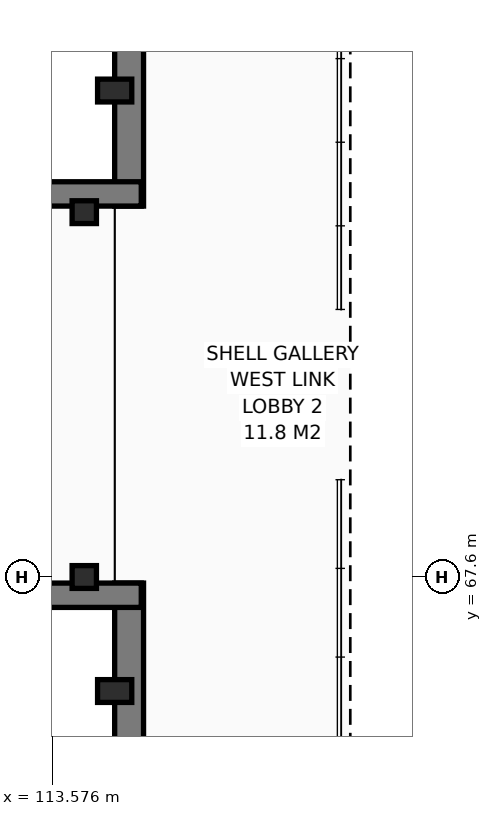
"""IFC4 building model, lengths in metres.
Left out: names, types, materials, properties, quantities, classifications, styles, units other than length and angle.
Written with IfcOpenShell. Run it as: python <this file> out.ifc"""

import sys

from ifc_helpers import new_model, si_unit, direction, frame, frame_2d, origin, origin_2d, place, context, subcontext, project, spatial, rectangle, i_section, extrude, element, save


model = new_model("IFC4")
c1 = context("Model", 3, precision=1e-05, world=origin(), true_north=direction((0.0, 1.0)))
c2 = subcontext(c1, "Body", "Model", "MODEL_VIEW")
j1 = project(units=[si_unit("LENGTHUNIT", "METRE"), si_unit("PLANEANGLEUNIT", "RADIAN")], contexts=[c1])
p1 = place(None, origin())
s1 = spatial("IfcSite", under=j1, at=p1, CompositionType="ELEMENT")
p2 = place(p1, origin())
s2 = spatial("IfcBuilding", under=s1, at=p2, CompositionType="ELEMENT")
p3 = place(p2, frame((0.0, 0.0, 5.1)))
s3 = spatial("IfcBuildingStorey", under=s2, at=p3, CompositionType="ELEMENT", Elevation=5.1)
for number, where, z_axis, x_axis in (
    (1, (114.4, 66.1, 0.0), (0.0, 0.0, 1.0), (1.0, 0.0, 0.0)),
    (2, (114.4, 74.0, 0.0), (0.0, 0.0, 1.0), (1.0, 0.0, 0.0)),
):
    element("IfcColumn", number, at=place(p3, frame(where, z_axis=z_axis, x_axis=x_axis)), inside=s3, PredefinedType="COLUMN", context=c2, shape_type="SweptSolid", body=[
        extrude(i_section(OverallWidth=0.3, OverallDepth=0.45, WebThickness=0.014, FlangeThickness=0.026, FilletRadius=0.027, at=origin_2d()), origin(), (0.0, 0.0, 1.0), 4.42),
    ])
for number, where, z_axis, x_axis in (
    (3, (114.0, 67.6, 0.0), (0.0, 0.0, 1.0), (1.0, 0.0, 0.0)),
    (4, (114.0, 72.4, 0.0), (0.0, 0.0, 1.0), (1.0, 0.0, 0.0)),
):
    element("IfcColumn", number, at=place(p3, frame(where, z_axis=z_axis, x_axis=x_axis)), inside=s3, PredefinedType="COLUMN", context=c2, shape_type="SweptSolid", body=[
        extrude(i_section(OverallWidth=0.3, OverallDepth=0.32, WebThickness=0.011, FlangeThickness=0.021, FilletRadius=0.027, at=origin_2d()), origin(), (0.0, 0.0, 1.0), 4.42),
    ])
p4 = place(p3, frame((114.59, 58.2, 0.0), z_axis=(0.0, 0.0, 1.0), x_axis=(0.0, 1.0, 0.0)))
e5 = element("IfcWall", 5, at=p4, inside=s3, PredefinedType="SOLIDWALL", context=c2, shape_type="SweptSolid", body=[
    extrude(rectangle(XDim=9.32, YDim=0.38, at=frame_2d((4.66, 0.0))), origin(), (0.0, 0.0, 1.0), 4.17),
])
p5 = place(p3, frame((114.59, 72.48, 0.0), z_axis=(0.0, 0.0, 1.0), x_axis=(0.0, 1.0, 0.0)))
e6 = element("IfcWall", 6, at=p5, inside=s3, PredefinedType="SOLIDWALL", context=c2, shape_type="SweptSolid", body=[
    extrude(rectangle(XDim=40.83, YDim=0.38, at=frame_2d((20.415, 0.0))), origin(), (0.0, 0.0, 1.0), 4.17),
])
p6 = place(p5, frame((5.805, 0.0, 0.85)))
e7 = element("IfcOpeningElement", 7, at=p6, cuts=e6, PredefinedType="OPENING", context=c2, shape_type="SweptSolid", body=[
    extrude(rectangle(XDim=2.7, YDim=1.5, at=frame_2d((1.35, 0.75))), frame((0.0, 0.2, 0.0), z_axis=(0.0, -1.0, 0.0), x_axis=(1.0, 0.0, 0.0)), (0.0, 0.0, 1.0), 0.4),
])
p7 = place(p5, frame((12.61, 0.0, 0.85)))
e8 = element("IfcOpeningElement", 8, at=p7, cuts=e6, PredefinedType="OPENING", context=c2, shape_type="SweptSolid", body=[
    extrude(rectangle(XDim=2.1, YDim=1.7, at=frame_2d((1.05, 0.85))), frame((0.0, 0.2, 0.0), z_axis=(0.0, -1.0, 0.0), x_axis=(1.0, 0.0, 0.0)), (0.0, 0.0, 1.0), 0.4),
])
p8 = place(p5, frame((19.415, 0.0, 0.85)))
e9 = element("IfcOpeningElement", 9, at=p8, cuts=e6, PredefinedType="OPENING", context=c2, shape_type="SweptSolid", body=[
    extrude(rectangle(XDim=2.5, YDim=1.7, at=frame_2d((1.25, 0.85))), frame((0.0, 0.2, 0.0), z_axis=(0.0, -1.0, 0.0), x_axis=(1.0, 0.0, 0.0)), (0.0, 0.0, 1.0), 0.4),
])
p9 = place(p5, frame((26.22, 0.0, 0.85)))
e10 = element("IfcOpeningElement", 10, at=p9, cuts=e6, PredefinedType="OPENING", context=c2, shape_type="SweptSolid", body=[
    extrude(rectangle(XDim=2.9, YDim=1.7, at=frame_2d((1.45, 0.85))), frame((0.0, 0.2, 0.0), z_axis=(0.0, -1.0, 0.0), x_axis=(1.0, 0.0, 0.0)), (0.0, 0.0, 1.0), 0.4),
])
p10 = place(p3, frame((114.75, 67.36, 0.0), z_axis=(0.0, 0.0, 1.0), x_axis=(-1.0, 0.0, 0.0)))
e11 = element("IfcWall", 11, at=p10, inside=s3, PredefinedType="SOLIDWALL", context=c2, shape_type="SweptSolid", body=[
    extrude(rectangle(XDim=6.466, YDim=0.32, at=frame_2d((3.233, 0.0))), origin(), (0.0, 0.0, 1.0), 4.18),
])
p11 = place(p3, frame((108.284, 72.64, 0.0), z_axis=(0.0, 0.0, 1.0), x_axis=(1.0, 0.0, 0.0)))
e12 = element("IfcWall", 12, at=p11, inside=s3, PredefinedType="SOLIDWALL", context=c2, shape_type="SweptSolid", body=[
    extrude(rectangle(XDim=6.466, YDim=0.32, at=frame_2d((3.233, 0.0))), origin(), (0.0, 0.0, 1.0), 4.18),
])
p12 = place(p11, frame((2.258, 0.0, 1.12)))
e13 = element("IfcOpeningElement", 13, at=p12, cuts=e12, PredefinedType="OPENING", context=c2, shape_type="SweptSolid", body=[
    extrude(rectangle(XDim=1.95, YDim=1.5, at=frame_2d((0.975, 0.75))), frame((0.0, 0.17, 0.0), z_axis=(0.0, -1.0, 0.0), x_axis=(1.0, 0.0, 0.0)), (0.0, 0.0, 1.0), 0.34),
])
save(model, sys.argv[1])
